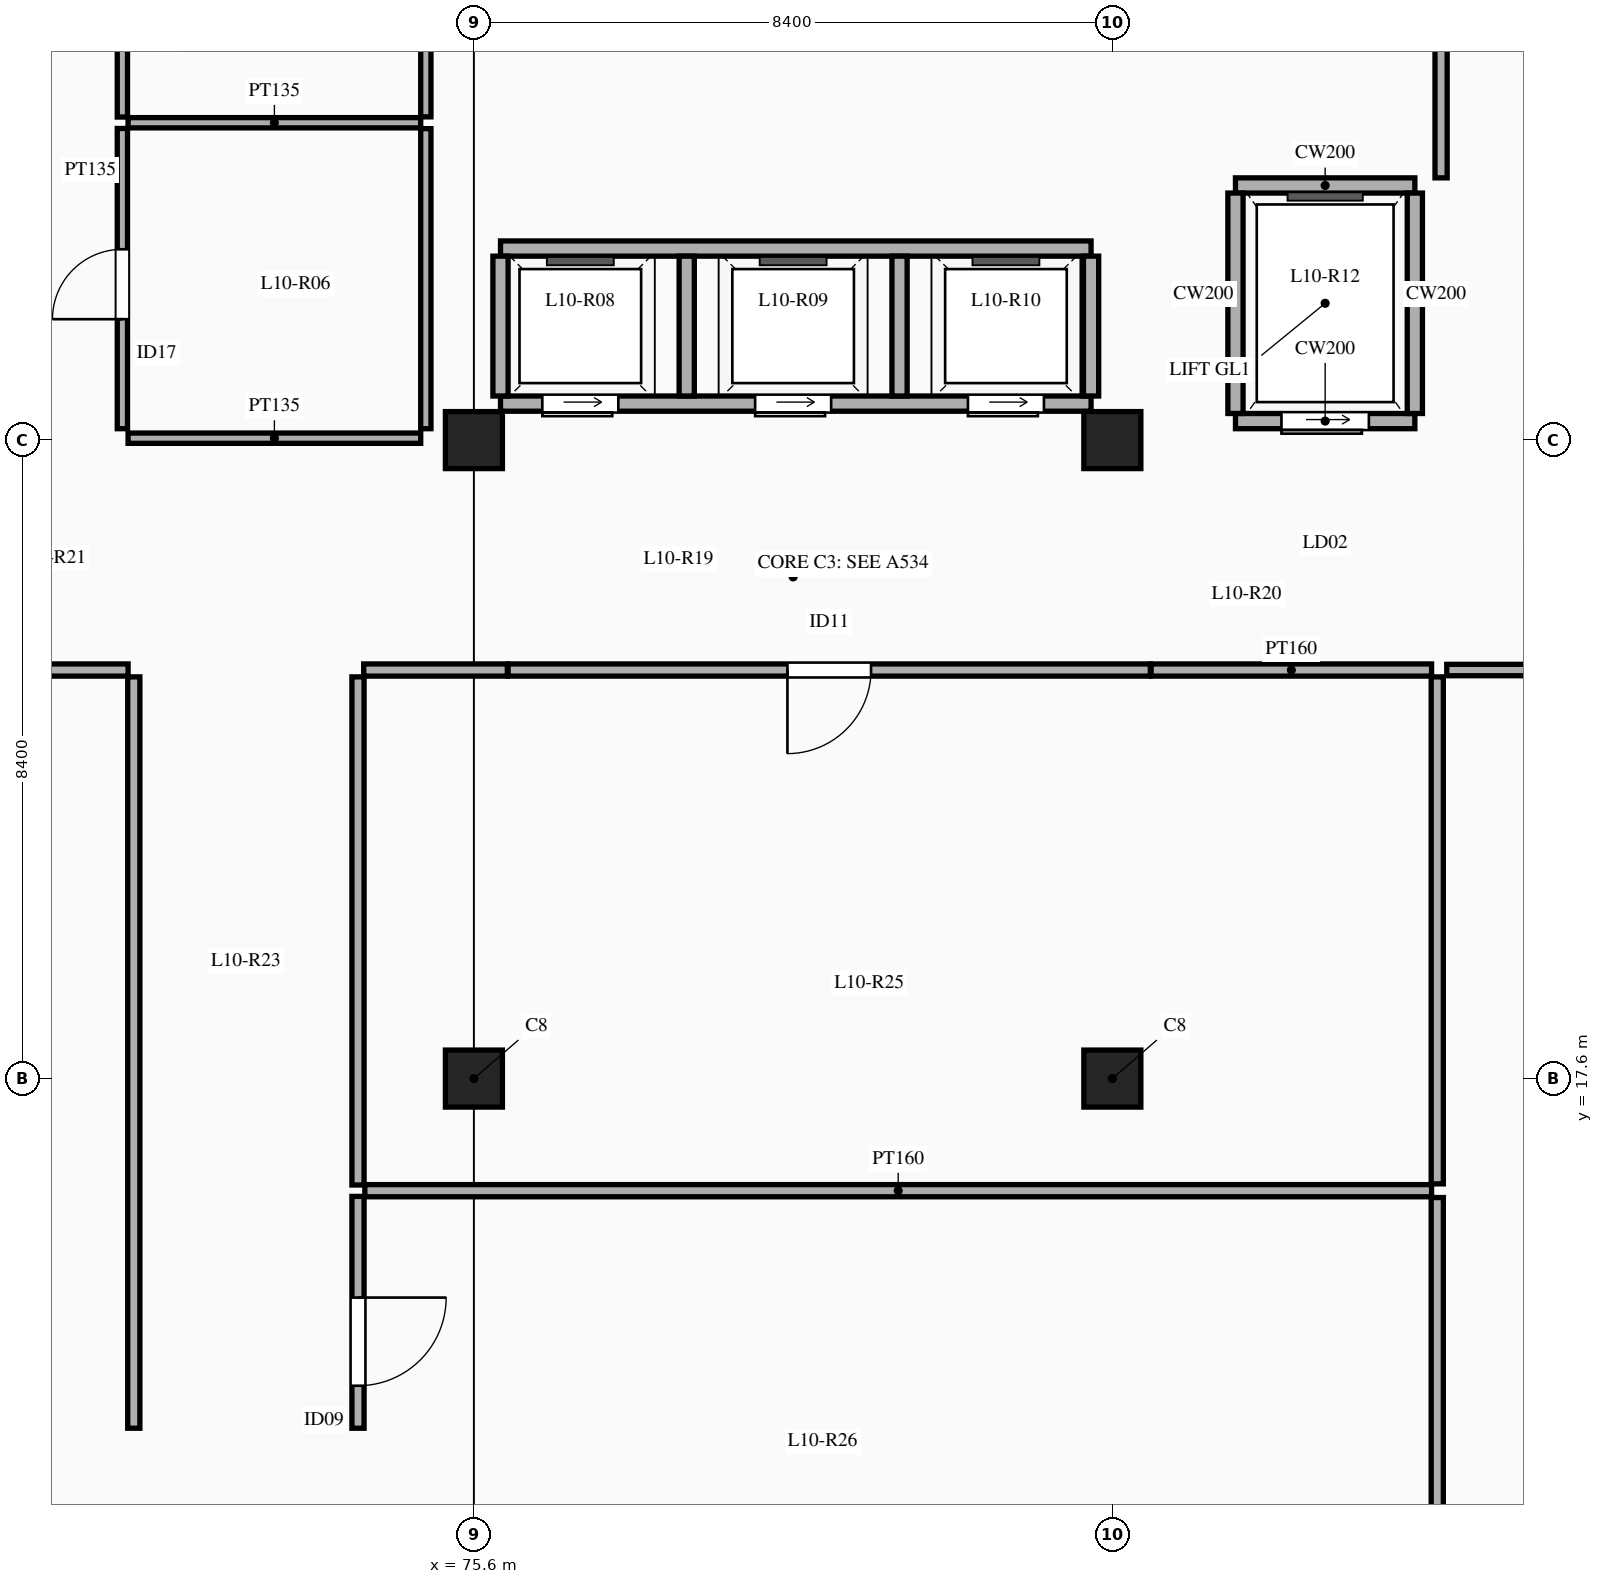
"""IFC4 building model, lengths in metres.
Left out: names, types, materials, properties, quantities, classifications, styles, units other than length and angle.
Written with IfcOpenShell. Run it as: python <this file> out.ifc"""

import sys

from ifc_helpers import new_model, si_unit, direction, frame, frame_2d, origin, origin_2d, place, context, subcontext, project, spatial, rectangle, extrude, element, fill, save


model = new_model("IFC4")
c1 = context("Model", 3, precision=1e-05, world=origin(), true_north=direction((0.0, 1.0)))
c2 = subcontext(c1, "Body", "Model", "MODEL_VIEW")
j1 = project(units=[si_unit("LENGTHUNIT", "METRE"), si_unit("PLANEANGLEUNIT", "RADIAN")], contexts=[c1])
p1 = place(None, origin())
s1 = spatial("IfcSite", under=j1, at=p1, CompositionType="ELEMENT")
p2 = place(p1, origin())
s2 = spatial("IfcBuilding", under=s1, at=p2, CompositionType="ELEMENT")
p3 = place(p2, frame((0.0, 0.0, 46.5)))
s3 = spatial("IfcBuildingStorey", under=s2, at=p3, CompositionType="ELEMENT", Elevation=46.5)
for number, where, z_axis, x_axis in (
    (1, (75.6, 17.6, 0.0), (0.0, 0.0, 1.0), (1.0, 0.0, 0.0)),
    (2, (75.6, 26.0, 0.0), (0.0, 0.0, 1.0), (1.0, 0.0, 0.0)),
    (3, (84.0, 17.6, 0.0), (0.0, 0.0, 1.0), (1.0, 0.0, 0.0)),
    (4, (84.0, 26.0, 0.0), (0.0, 0.0, 1.0), (1.0, 0.0, 0.0)),
):
    element("IfcColumn", number, at=place(p3, frame(where, z_axis=z_axis, x_axis=x_axis)), inside=s3, PredefinedType="COLUMN", context=c2, shape_type="SweptSolid", body=[
        extrude(rectangle(XDim=0.75, YDim=0.75, at=origin_2d()), origin(), (0.0, 0.0, 1.0), 4.5),
    ])
p4 = place(p3, frame((75.95, 26.48, 0.0), z_axis=(0.0, 0.0, 1.0), x_axis=(1.0, 0.0, 0.0)))
e5 = element("IfcWall", 5, at=p4, inside=s3, PredefinedType="SOLIDWALL", context=c2, shape_type="SweptSolid", body=[
    extrude(rectangle(XDim=7.77, YDim=0.2, at=frame_2d((3.885, 0.0))), origin(), (0.0, 0.0, 1.0), 4.3),
])
p5 = place(p4, frame((0.55, 0.0, 0.0)))
e6 = element("IfcOpeningElement", 6, at=p5, cuts=e5, PredefinedType="OPENING", context=c2, shape_type="SweptSolid", body=[
    extrude(rectangle(XDim=1.0, YDim=2.15, at=frame_2d((0.5, 1.075))), frame((0.0, 0.11, 0.0), z_axis=(0.0, -1.0, 0.0), x_axis=(1.0, 0.0, 0.0)), (0.0, 0.0, 1.0), 0.22),
])
p6 = place(p4, frame((3.35, 0.0, 0.0)))
e7 = element("IfcOpeningElement", 7, at=p6, cuts=e5, PredefinedType="OPENING", context=c2, shape_type="SweptSolid", body=[
    extrude(rectangle(XDim=1.0, YDim=2.15, at=frame_2d((0.5, 1.075))), frame((0.0, 0.11, 0.0), z_axis=(0.0, -1.0, 0.0), x_axis=(1.0, 0.0, 0.0)), (0.0, 0.0, 1.0), 0.22),
])
p7 = place(p4, frame((6.15, 0.0, 0.0)))
e8 = element("IfcOpeningElement", 8, at=p7, cuts=e5, PredefinedType="OPENING", context=c2, shape_type="SweptSolid", body=[
    extrude(rectangle(XDim=1.0, YDim=2.15, at=frame_2d((0.5, 1.075))), frame((0.0, 0.11, 0.0), z_axis=(0.0, -1.0, 0.0), x_axis=(1.0, 0.0, 0.0)), (0.0, 0.0, 1.0), 0.22),
])
p8 = place(p3, frame((75.95, 28.52, 0.0), z_axis=(0.0, 0.0, 1.0), x_axis=(1.0, 0.0, 0.0)))
e9 = element("IfcWall", 9, at=p8, inside=s3, PredefinedType="SOLIDWALL", context=c2, shape_type="SweptSolid", body=[
    extrude(rectangle(XDim=7.77, YDim=0.2, at=frame_2d((3.885, 0.0))), origin(), (0.0, 0.0, 1.0), 4.3),
])
for number, where, z_axis, x_axis in (
    (10, (75.95, 26.58, 0.0), (0.0, 0.0, 1.0), (0.0, 1.0, 0.0)),
    (11, (78.4, 26.58, 0.0), (0.0, 0.0, 1.0), (0.0, 1.0, 0.0)),
    (12, (81.2, 26.58, 0.0), (0.0, 0.0, 1.0), (0.0, 1.0, 0.0)),
):
    element("IfcWall", number, at=place(p3, frame(where, z_axis=z_axis, x_axis=x_axis)), inside=s3, PredefinedType="SOLIDWALL", context=c2, shape_type="SweptSolid", body=[
        extrude(rectangle(XDim=1.84, YDim=0.2, at=frame_2d((0.92, 0.0))), origin(), (0.0, 0.0, 1.0), 4.3),
    ])
p9 = place(p3, frame((83.72, 26.58, 0.0), z_axis=(0.0, 0.0, 1.0), x_axis=(0.0, 1.0, 0.0)))
e13 = element("IfcWall", 13, at=p9, inside=s3, PredefinedType="SOLIDWALL", context=c2, shape_type="SweptSolid", body=[
    extrude(rectangle(XDim=1.84, YDim=0.2, at=frame_2d((0.92, 0.0))), origin(), (0.0, 0.0, 1.0), 3.88),
])
p10 = place(p3, frame((85.62, 26.25, 0.0), z_axis=(0.0, 0.0, 1.0), x_axis=(1.0, 0.0, 0.0)))
e14 = element("IfcWall", 14, at=p10, inside=s3, PredefinedType="SOLIDWALL", context=c2, shape_type="SweptSolid", body=[
    extrude(rectangle(XDim=2.36, YDim=0.2, at=frame_2d((1.18, 0.0))), origin(), (0.0, 0.0, 1.0), 3.83),
])
p11 = place(p10, frame((0.605, 0.0, 0.0)))
e15 = element("IfcOpeningElement", 15, at=p11, cuts=e14, PredefinedType="OPENING", context=c2, shape_type="SweptSolid", body=[
    extrude(rectangle(XDim=1.15, YDim=2.2, at=frame_2d((0.575, 1.1))), frame((0.0, 0.11, 0.0), z_axis=(0.0, -1.0, 0.0), x_axis=(1.0, 0.0, 0.0)), (0.0, 0.0, 1.0), 0.22),
])
p12 = place(p3, frame((85.62, 29.35, 0.0), z_axis=(0.0, 0.0, 1.0), x_axis=(1.0, 0.0, 0.0)))
e16 = element("IfcWall", 16, at=p12, inside=s3, PredefinedType="SOLIDWALL", context=c2, shape_type="SweptSolid", body=[
    extrude(rectangle(XDim=2.36, YDim=0.2, at=frame_2d((1.18, 0.0))), origin(), (0.0, 0.0, 1.0), 4.3),
])
p13 = place(p3, frame((85.62, 26.35, 0.0), z_axis=(0.0, 0.0, 1.0), x_axis=(0.0, 1.0, 0.0)))
e17 = element("IfcWall", 17, at=p13, inside=s3, PredefinedType="SOLIDWALL", context=c2, shape_type="SweptSolid", body=[
    extrude(rectangle(XDim=2.9, YDim=0.2, at=frame_2d((1.45, 0.0))), origin(), (0.0, 0.0, 1.0), 4.3),
])
p14 = place(p3, frame((87.98, 26.35, 0.0), z_axis=(0.0, 0.0, 1.0), x_axis=(0.0, 1.0, 0.0)))
e18 = element("IfcWall", 18, at=p14, inside=s3, PredefinedType="SOLIDWALL", context=c2, shape_type="SweptSolid", body=[
    extrude(rectangle(XDim=2.9, YDim=0.2, at=frame_2d((1.45, 0.0))), origin(), (0.0, 0.0, 1.0), 4.03),
])
p15 = place(p3, frame((70.975, 26.15, 0.0), z_axis=(0.0, 0.0, 1.0), x_axis=(0.0, 1.0, 0.0)))
e19 = element("IfcWall", 19, at=p15, inside=s3, PredefinedType="PARTITIONING", context=c2, shape_type="SweptSolid", body=[
    extrude(rectangle(XDim=3.95, YDim=0.135, at=frame_2d((1.975, 0.0))), origin(), (0.0, 0.0, 1.0), 3.45),
])
p16 = place(p15, frame((1.441, 0.0, 0.0)))
e20 = element("IfcOpeningElement", 20, at=p16, cuts=e19, PredefinedType="OPENING", context=c2, shape_type="SweptSolid", body=[
    extrude(rectangle(XDim=0.92, YDim=2.12, at=frame_2d((0.46, 1.06))), frame((0.0, 0.077, 0.0), z_axis=(0.0, -1.0, 0.0), x_axis=(1.0, 0.0, 0.0)), (0.0, 0.0, 1.0), 0.155),
])
p17 = place(p3, frame((70.975, 30.25, 0.0), z_axis=(0.0, 0.0, 1.0), x_axis=(0.0, 1.0, 0.0)))
e21 = element("IfcWall", 21, at=p17, inside=s3, PredefinedType="PARTITIONING", context=c2, shape_type="SweptSolid", body=[
    extrude(rectangle(XDim=3.9, YDim=0.135, at=frame_2d((1.95, 0.0))), origin(), (0.0, 0.0, 1.0), 3.45),
])
p18 = place(p17, frame((1.46, 0.0, 0.0)))
e22 = element("IfcOpeningElement", 22, at=p18, cuts=e21, PredefinedType="OPENING", context=c2, shape_type="SweptSolid", body=[
    extrude(rectangle(XDim=0.98, YDim=2.15, at=frame_2d((0.49, 1.075))), frame((0.0, 0.077, 0.0), z_axis=(0.0, -1.0, 0.0), x_axis=(1.0, 0.0, 0.0)), (0.0, 0.0, 1.0), 0.155),
])
for number, where, z_axis, x_axis in (
    (23, (71.05, 30.175, 0.0), (0.0, 0.0, 1.0), (1.0, 0.0, 0.0)),
    (24, (71.05, 26.025, 0.0), (0.0, 0.0, 1.0), (1.0, 0.0, 0.0)),
):
    element("IfcWall", number, at=place(p3, frame(where, z_axis=z_axis, x_axis=x_axis)), inside=s3, PredefinedType="PARTITIONING", context=c2, shape_type="SweptSolid", body=[
        extrude(rectangle(XDim=3.85, YDim=0.135, at=frame_2d((1.925, 0.0))), origin(), (0.0, 0.0, 1.0), 3.45),
    ])
p19 = place(p3, frame((88.325, 29.45, 0.0), z_axis=(0.0, 0.0, 1.0), x_axis=(0.0, 1.0, 0.0)))
e25 = element("IfcWall", 25, at=p19, inside=s3, PredefinedType="PARTITIONING", context=c2, shape_type="SweptSolid", body=[
    extrude(rectangle(XDim=4.7, YDim=0.16, at=frame_2d((2.35, 0.0))), origin(), (0.0, 0.0, 1.0), 3.45),
])
p20 = place(p3, frame((76.05, 22.975, 0.0), z_axis=(0.0, 0.0, 1.0), x_axis=(1.0, 0.0, 0.0)))
e26 = element("IfcWall", 26, at=p20, inside=s3, PredefinedType="PARTITIONING", context=c2, shape_type="SweptSolid", body=[
    extrude(rectangle(XDim=8.45, YDim=0.16, at=frame_2d((4.225, 0.0))), origin(), (0.0, 0.0, 1.0), 3.45),
])
p21 = place(p20, frame((3.675, 0.0, 0.0)))
e27 = element("IfcOpeningElement", 27, at=p21, cuts=e26, PredefinedType="OPENING", context=c2, shape_type="SweptSolid", body=[
    extrude(rectangle(XDim=1.1, YDim=2.2, at=frame_2d((0.55, 1.1))), frame((0.0, 0.09, 0.0), z_axis=(0.0, -1.0, 0.0), x_axis=(1.0, 0.0, 0.0)), (0.0, 0.0, 1.0), 0.18),
])
p22 = place(p3, frame((84.51, 22.975, 0.0), z_axis=(0.0, 0.0, 1.0), x_axis=(1.0, 0.0, 0.0)))
e28 = element("IfcWall", 28, at=p22, inside=s3, PredefinedType="PARTITIONING", context=c2, shape_type="SweptSolid", body=[
    extrude(rectangle(XDim=3.69, YDim=0.16, at=frame_2d((1.845, 0.0))), origin(), (0.0, 0.0, 1.0), 3.45),
])
p23 = place(p3, frame((50.85, 22.975, 0.0), z_axis=(0.0, 0.0, 1.0), x_axis=(1.0, 0.0, 0.0)))
e29 = element("IfcWall", 29, at=p23, inside=s3, PredefinedType="PARTITIONING", context=c2, shape_type="SweptSolid", body=[
    extrude(rectangle(XDim=20.2, YDim=0.16, at=frame_2d((10.1, 0.0))), origin(), (0.0, 0.0, 1.0), 3.45),
])
p24 = place(p23, frame((9.55, 0.0, 0.0)))
e30 = element("IfcOpeningElement", 30, at=p24, cuts=e29, PredefinedType="OPENING", context=c2, shape_type="SweptSolid", body=[
    extrude(rectangle(XDim=1.1, YDim=2.2, at=frame_2d((0.55, 1.1))), frame((0.0, 0.09, 0.0), z_axis=(0.0, -1.0, 0.0), x_axis=(1.0, 0.0, 0.0)), (0.0, 0.0, 1.0), 0.18),
])
p25 = place(p3, frame((74.15, 22.975, 0.0), z_axis=(0.0, 0.0, 1.0), x_axis=(1.0, 0.0, 0.0)))
e31 = element("IfcWall", 31, at=p25, inside=s3, PredefinedType="PARTITIONING", context=c2, shape_type="SweptSolid", body=[
    extrude(rectangle(XDim=1.89, YDim=0.16, at=frame_2d((0.945, 0.0))), origin(), (0.0, 0.0, 1.0), 3.45),
])
p26 = place(p3, frame((88.4, 22.975, 0.0), z_axis=(0.0, 0.0, 1.0), x_axis=(1.0, 0.0, 0.0)))
e32 = element("IfcWall", 32, at=p26, inside=s3, PredefinedType="PARTITIONING", context=c2, shape_type="SweptSolid", body=[
    extrude(rectangle(XDim=11.95, YDim=0.15, at=frame_2d((5.975, 0.0))), origin(), (0.0, 0.0, 1.0), 3.45),
])
p27 = place(p26, frame((5.475, 0.0, 0.0)))
e33 = element("IfcOpeningElement", 33, at=p27, cuts=e32, PredefinedType="OPENING", context=c2, shape_type="SweptSolid", body=[
    extrude(rectangle(XDim=1.0, YDim=2.15, at=frame_2d((0.5, 1.075))), frame((0.0, 0.085, 0.0), z_axis=(0.0, -1.0, 0.0), x_axis=(1.0, 0.0, 0.0)), (0.0, 0.0, 1.0), 0.17),
])
p28 = place(p3, frame((71.125, 13.0, 0.0), z_axis=(0.0, 0.0, 1.0), x_axis=(0.0, 1.0, 0.0)))
e34 = element("IfcWall", 34, at=p28, inside=s3, PredefinedType="PARTITIONING", context=c2, shape_type="SweptSolid", body=[
    extrude(rectangle(XDim=9.885, YDim=0.16, at=frame_2d((4.942, 0.0))), origin(), (0.0, 0.0, 1.0), 3.45),
])
p29 = place(p3, frame((74.075, 16.2, 0.0), z_axis=(0.0, 0.0, 1.0), x_axis=(0.0, 1.0, 0.0)))
e35 = element("IfcWall", 35, at=p29, inside=s3, PredefinedType="PARTITIONING", context=c2, shape_type="SweptSolid", body=[
    extrude(rectangle(XDim=6.685, YDim=0.16, at=frame_2d((3.343, 0.0))), origin(), (0.0, 0.0, 1.0), 3.45),
])
p30 = place(p3, frame((74.075, 13.0, 0.0), z_axis=(0.0, 0.0, 1.0), x_axis=(0.0, 1.0, 0.0)))
e36 = element("IfcWall", 36, at=p30, inside=s3, PredefinedType="PARTITIONING", context=c2, shape_type="SweptSolid", body=[
    extrude(rectangle(XDim=3.05, YDim=0.16, at=frame_2d((1.525, 0.0))), origin(), (0.0, 0.0, 1.0), 3.45),
])
p31 = place(p30, frame((0.559, 0.0, 0.0)))
e37 = element("IfcOpeningElement", 37, at=p31, cuts=e36, PredefinedType="OPENING", context=c2, shape_type="SweptSolid", body=[
    extrude(rectangle(XDim=1.16, YDim=2.2, at=frame_2d((0.58, 1.1))), frame((0.0, 0.09, 0.0), z_axis=(0.0, -1.0, 0.0), x_axis=(1.0, 0.0, 0.0)), (0.0, 0.0, 1.0), 0.18),
])
p32 = place(p3, frame((74.165, 16.125, 0.0), z_axis=(0.0, 0.0, 1.0), x_axis=(1.0, 0.0, 0.0)))
e38 = element("IfcWall", 38, at=p32, inside=s3, PredefinedType="PARTITIONING", context=c2, shape_type="SweptSolid", body=[
    extrude(rectangle(XDim=14.035, YDim=0.16, at=frame_2d((7.018, 0.0))), origin(), (0.0, 0.0, 1.0), 3.45),
])
p33 = place(p3, frame((88.275, 16.215, 0.0), z_axis=(0.0, 0.0, 1.0), x_axis=(0.0, 1.0, 0.0)))
e39 = element("IfcWall", 39, at=p33, inside=s3, PredefinedType="PARTITIONING", context=c2, shape_type="SweptSolid", body=[
    extrude(rectangle(XDim=6.67, YDim=0.16, at=frame_2d((3.335, 0.0))), origin(), (0.0, 0.0, 1.0), 3.45),
])
p34 = place(p3, frame((88.275, 9.65, 0.0), z_axis=(0.0, 0.0, 1.0), x_axis=(0.0, 1.0, 0.0)))
e40 = element("IfcWall", 40, at=p34, inside=s3, PredefinedType="PARTITIONING", context=c2, shape_type="SweptSolid", body=[
    extrude(rectangle(XDim=6.385, YDim=0.16, at=frame_2d((3.192, 0.0))), origin(), (0.0, 0.0, 1.0), 3.45),
])
p35 = place(p3, frame((74.968, 26.15, 0.0), z_axis=(0.0, 0.0, 1.0), x_axis=(0.0, 1.0, 0.0)))
e41 = element("IfcWall", 41, at=p35, inside=s3, PredefinedType="PARTITIONING", context=c2, shape_type="SweptSolid", body=[
    extrude(rectangle(XDim=3.948, YDim=0.135, at=frame_2d((1.974, 0.0))), origin(), (0.0, 0.0, 1.0), 3.45),
])
p36 = place(p3, frame((74.968, 30.252, 0.0), z_axis=(0.0, 0.0, 1.0), x_axis=(0.0, 1.0, 0.0)))
e42 = element("IfcWall", 42, at=p36, inside=s3, PredefinedType="PARTITIONING", context=c2, shape_type="SweptSolid", body=[
    extrude(rectangle(XDim=3.895, YDim=0.135, at=frame_2d((1.948, 0.0))), origin(), (0.0, 0.0, 1.0), 3.45),
])
p37 = place(p5, frame((1.0, 0.0, 0.0), z_axis=(0.0, 0.0, 1.0), x_axis=(-1.0, 0.0, 0.0)))
e43 = element("IfcDoor", 43, at=p37, inside=s3, OperationType="SLIDING_TO_LEFT", PredefinedType="DOOR", context=c2, shape_type="SweptSolid", body=[
    extrude(rectangle(XDim=1.0, YDim=2.15, at=frame_2d((0.5, 1.075))), frame((0.0, 0.025, 0.0), z_axis=(0.0, -1.0, 0.0), x_axis=(1.0, 0.0, 0.0)), (0.0, 0.0, 1.0), 0.05),
])
fill(e6, e43)
p38 = place(p6, frame((1.0, 0.0, 0.0), z_axis=(0.0, 0.0, 1.0), x_axis=(-1.0, 0.0, 0.0)))
e44 = element("IfcDoor", 44, at=p38, inside=s3, OperationType="SLIDING_TO_LEFT", PredefinedType="DOOR", context=c2, shape_type="SweptSolid", body=[
    extrude(rectangle(XDim=1.0, YDim=2.15, at=frame_2d((0.5, 1.075))), frame((0.0, 0.025, 0.0), z_axis=(0.0, -1.0, 0.0), x_axis=(1.0, 0.0, 0.0)), (0.0, 0.0, 1.0), 0.05),
])
fill(e7, e44)
p39 = place(p7, frame((1.0, 0.0, 0.0), z_axis=(0.0, 0.0, 1.0), x_axis=(-1.0, 0.0, 0.0)))
e45 = element("IfcDoor", 45, at=p39, inside=s3, OperationType="SLIDING_TO_LEFT", PredefinedType="DOOR", context=c2, shape_type="SweptSolid", body=[
    extrude(rectangle(XDim=1.0, YDim=2.15, at=frame_2d((0.5, 1.075))), frame((0.0, 0.025, 0.0), z_axis=(0.0, -1.0, 0.0), x_axis=(1.0, 0.0, 0.0)), (0.0, 0.0, 1.0), 0.05),
])
fill(e8, e45)
p40 = place(p11, frame((1.15, 0.0, 0.0), z_axis=(0.0, 0.0, 1.0), x_axis=(-1.0, 0.0, 0.0)))
e46 = element("IfcDoor", 46, at=p40, inside=s3, OperationType="SLIDING_TO_LEFT", PredefinedType="DOOR", context=c2, shape_type="SweptSolid", body=[
    extrude(rectangle(XDim=1.15, YDim=2.2, at=frame_2d((0.575, 1.1))), frame((0.0, 0.025, 0.0), z_axis=(0.0, -1.0, 0.0), x_axis=(1.0, 0.0, 0.0)), (0.0, 0.0, 1.0), 0.05),
])
fill(e15, e46)
p41 = place(p16, origin())
e47 = element("IfcDoor", 47, at=p41, inside=s3, OperationType="SINGLE_SWING_LEFT", PredefinedType="DOOR", context=c2, shape_type="SweptSolid", body=[
    extrude(rectangle(XDim=0.92, YDim=2.12, at=frame_2d((0.46, 1.06))), frame((0.0, 0.025, 0.0), z_axis=(0.0, -1.0, 0.0), x_axis=(1.0, 0.0, 0.0)), (0.0, 0.0, 1.0), 0.05),
])
fill(e20, e47)
p42 = place(p21, frame((1.1, 0.0, 0.0), z_axis=(0.0, 0.0, 1.0), x_axis=(-1.0, 0.0, 0.0)))
e48 = element("IfcDoor", 48, at=p42, inside=s3, OperationType="SINGLE_SWING_RIGHT", PredefinedType="DOOR", context=c2, shape_type="SweptSolid", body=[
    extrude(rectangle(XDim=1.1, YDim=2.2, at=frame_2d((0.55, 1.1))), frame((0.0, 0.025, 0.0), z_axis=(0.0, -1.0, 0.0), x_axis=(1.0, 0.0, 0.0)), (0.0, 0.0, 1.0), 0.05),
])
fill(e27, e48)
p43 = place(p31, frame((1.16, 0.0, 0.0), z_axis=(0.0, 0.0, 1.0), x_axis=(-1.0, 0.0, 0.0)))
e49 = element("IfcDoor", 49, at=p43, inside=s3, OperationType="SINGLE_SWING_LEFT", PredefinedType="DOOR", context=c2, shape_type="SweptSolid", body=[
    extrude(rectangle(XDim=1.16, YDim=2.2, at=frame_2d((0.58, 1.1))), frame((0.0, 0.025, 0.0), z_axis=(0.0, -1.0, 0.0), x_axis=(1.0, 0.0, 0.0)), (0.0, 0.0, 1.0), 0.05),
])
fill(e37, e49)
save(model, sys.argv[1])
